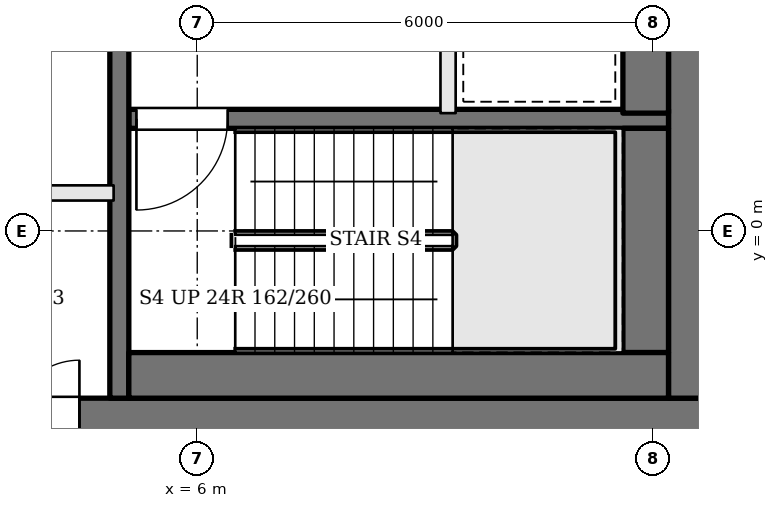
"""IFC4 building model, lengths in metres.
Left out: names, types, materials, properties, quantities, classifications, styles, units other than length and angle.
Written with IfcOpenShell. Run it as: python <this file> out.ifc"""

import sys

from ifc_helpers import new_model, si_unit, direction, frame, frame_2d, origin, place, context, subcontext, project, spatial, rectangle, extrude, element, fill, save


model = new_model("IFC4")
c1 = context("Model", 3, precision=1e-05, world=origin(), true_north=direction((0.0, 1.0)))
c2 = subcontext(c1, "Body", "Model", "MODEL_VIEW")
j1 = project(units=[si_unit("LENGTHUNIT", "METRE"), si_unit("PLANEANGLEUNIT", "RADIAN")], contexts=[c1])
p1 = place(None, origin())
s1 = spatial("IfcSite", under=j1, at=p1, CompositionType="ELEMENT")
p2 = place(p1, origin())
s2 = spatial("IfcBuilding", under=s1, at=p2, CompositionType="ELEMENT")
p3 = place(p2, frame((0.0, 0.0, 185.7)))
s3 = spatial("IfcBuildingStorey", under=s2, at=p3, CompositionType="ELEMENT", Elevation=185.7)
p4 = place(p3, frame((-13.0, -2.6, 0.0), z_axis=(0.0, 0.0, 1.0), x_axis=(1.0, 0.0, 0.0)))
e1 = element("IfcWall", 1, at=p4, inside=s3, PredefinedType="SHEAR", context=c2, shape_type="SweptSolid", body=[
    extrude(rectangle(XDim=26.0, YDim=0.8, at=frame_2d((13.0, 0.0))), origin(), (0.0, 0.0, 1.0), 3.9),
])
p5 = place(p4, frame((9.2, 0.0, 0.0)))
e2 = element("IfcOpeningElement", 2, at=p5, cuts=e1, PredefinedType="OPENING", context=c2, shape_type="SweptSolid", body=[
    extrude(rectangle(XDim=0.9, YDim=2.1, at=frame_2d((0.45, 1.05))), frame((0.0, 0.41, 0.0), z_axis=(0.0, -1.0, 0.0), x_axis=(1.0, 0.0, 0.0)), (0.0, 0.0, 1.0), 0.82),
])
p6 = place(p4, frame((12.3, 0.0, 0.0)))
e3 = element("IfcOpeningElement", 3, at=p6, cuts=e1, PredefinedType="OPENING", context=c2, shape_type="SweptSolid", body=[
    extrude(rectangle(XDim=0.9, YDim=2.1, at=frame_2d((0.45, 1.05))), frame((0.0, 0.41, 0.0), z_axis=(0.0, -1.0, 0.0), x_axis=(1.0, 0.0, 0.0)), (0.0, 0.0, 1.0), 0.82),
])
p7 = place(p4, frame((14.7, 0.0, 0.0)))
e4 = element("IfcOpeningElement", 4, at=p7, cuts=e1, PredefinedType="OPENING", context=c2, shape_type="SweptSolid", body=[
    extrude(rectangle(XDim=1.0, YDim=2.1, at=frame_2d((0.5, 1.05))), frame((0.0, 0.41, 0.0), z_axis=(0.0, -1.0, 0.0), x_axis=(1.0, 0.0, 0.0)), (0.0, 0.0, 1.0), 0.82),
])
p8 = place(p4, frame((16.55, 0.0, 0.0)))
e5 = element("IfcOpeningElement", 5, at=p8, cuts=e1, PredefinedType="OPENING", context=c2, shape_type="SweptSolid", body=[
    extrude(rectangle(XDim=0.9, YDim=2.1, at=frame_2d((0.45, 1.05))), frame((0.0, 0.41, 0.0), z_axis=(0.0, -1.0, 0.0), x_axis=(1.0, 0.0, 0.0)), (0.0, 0.0, 1.0), 0.82),
])
p9 = place(p3, frame((12.6, -2.2, 0.0), z_axis=(0.0, 0.0, 1.0), x_axis=(0.0, 1.0, 0.0)))
e6 = element("IfcWall", 6, at=p9, inside=s3, PredefinedType="SHEAR", context=c2, shape_type="SweptSolid", body=[
    extrude(rectangle(XDim=13.4, YDim=0.8, at=frame_2d((6.7, 0.0))), origin(), (0.0, 0.0, 1.0), 3.9),
])
p10 = place(p9, frame((7.4, 0.0, 0.0)))
e7 = element("IfcOpeningElement", 7, at=p10, cuts=e6, PredefinedType="OPENING", context=c2, shape_type="SweptSolid", body=[
    extrude(rectangle(XDim=1.8, YDim=2.1, at=frame_2d((0.9, 1.05))), frame((0.0, 0.41, 0.0), z_axis=(0.0, -1.0, 0.0), x_axis=(1.0, 0.0, 0.0)), (0.0, 0.0, 1.0), 0.82),
])
p11 = place(p3, frame((12.2, 1.475, 0.0), z_axis=(0.0, 0.0, 1.0), x_axis=(-1.0, 0.0, 0.0)))
e8 = element("IfcWall", 8, at=p11, inside=s3, PredefinedType="SOLIDWALL", context=c2, shape_type="SweptSolid", body=[
    extrude(rectangle(XDim=7.1, YDim=0.25, at=frame_2d((3.55, 0.0))), origin(), (0.0, 0.0, 1.0), 3.7),
])
p12 = place(p11, frame((5.8, 0.0, 0.0)))
e9 = element("IfcOpeningElement", 9, at=p12, cuts=e8, PredefinedType="OPENING", context=c2, shape_type="SweptSolid", body=[
    extrude(rectangle(XDim=1.2, YDim=2.1, at=frame_2d((0.6, 1.05))), frame((0.0, 0.135, 0.0), z_axis=(0.0, -1.0, 0.0), x_axis=(1.0, 0.0, 0.0)), (0.0, 0.0, 1.0), 0.27),
])
p13 = place(p3, frame((9.3, 4.55, 0.0), z_axis=(0.0, 0.0, 1.0), x_axis=(0.0, -1.0, 0.0)))
e10 = element("IfcWall", 10, at=p13, inside=s3, PredefinedType="SOLIDWALL", context=c2, shape_type="SweptSolid", body=[
    extrude(rectangle(XDim=3.0, YDim=0.2, at=frame_2d((1.5, 0.0))), origin(), (0.0, 0.0, 1.0), 3.7),
])
p14 = place(p3, frame((4.975, 11.2, 0.0), z_axis=(0.0, 0.0, 1.0), x_axis=(0.0, -1.0, 0.0)))
e11 = element("IfcWall", 11, at=p14, inside=s3, PredefinedType="SOLIDWALL", context=c2, shape_type="SweptSolid", body=[
    extrude(rectangle(XDim=13.4, YDim=0.25, at=frame_2d((6.7, 0.0))), origin(), (0.0, 0.0, 1.0), 3.7),
])
p15 = place(p14, frame((5.25, 0.0, 0.0)))
e12 = element("IfcOpeningElement", 12, at=p15, cuts=e11, PredefinedType="OPENING", context=c2, shape_type="SweptSolid", body=[
    extrude(rectangle(XDim=1.2, YDim=2.1, at=frame_2d((0.6, 1.05))), frame((0.0, 0.135, 0.0), z_axis=(0.0, -1.0, 0.0), x_axis=(1.0, 0.0, 0.0)), (0.0, 0.0, 1.0), 0.27),
])
p16 = place(p3, frame((11.9, 4.55, 0.0), z_axis=(0.0, 0.0, 1.0), x_axis=(0.0, -1.0, 0.0)))
e13 = element("IfcWall", 13, at=p16, inside=s3, PredefinedType="SOLIDWALL", context=c2, shape_type="SweptSolid", body=[
    extrude(rectangle(XDim=3.0, YDim=0.6, at=frame_2d((1.5, 0.0))), origin(), (0.0, 0.0, 1.0), 3.7),
])
p17 = place(p3, frame((11.9, 1.35, 0.0), z_axis=(0.0, 0.0, 1.0), x_axis=(0.0, -1.0, 0.0)))
e14 = element("IfcWall", 14, at=p17, inside=s3, PredefinedType="SOLIDWALL", context=c2, shape_type="SweptSolid", body=[
    extrude(rectangle(XDim=2.95, YDim=0.6, at=frame_2d((1.475, 0.0))), origin(), (0.0, 0.0, 1.0), 3.7),
])
p18 = place(p3, frame((12.2, -1.9, 0.0), z_axis=(0.0, 0.0, 1.0), x_axis=(-1.0, 0.0, 0.0)))
e15 = element("IfcWall", 15, at=p18, inside=s3, PredefinedType="SOLIDWALL", context=c2, shape_type="SweptSolid", body=[
    extrude(rectangle(XDim=7.1, YDim=0.6, at=frame_2d((3.55, 0.0))), origin(), (0.0, 0.0, 1.0), 3.7),
])
p19 = place(p3, frame((-4.9, 0.5, 0.0), z_axis=(0.0, 0.0, 1.0), x_axis=(1.0, 0.0, 0.0)))
e16 = element("IfcWall", 16, at=p19, inside=s3, PredefinedType="SOLIDWALL", context=c2, shape_type="SweptSolid", body=[
    extrude(rectangle(XDim=9.8, YDim=0.2, at=frame_2d((4.9, 0.0))), origin(), (0.0, 0.0, 1.0), 3.7),
])
p20 = place(p12, origin())
e17 = element("IfcDoor", 17, at=p20, inside=s3, OperationType="SINGLE_SWING_RIGHT", PredefinedType="DOOR", context=c2, shape_type="SweptSolid", body=[
    extrude(rectangle(XDim=1.2, YDim=2.1, at=frame_2d((0.6, 1.05))), frame((0.0, 0.025, 0.0), z_axis=(0.0, -1.0, 0.0), x_axis=(1.0, 0.0, 0.0)), (0.0, 0.0, 1.0), 0.05),
])
fill(e9, e17)
p21 = place(p8, origin())
e18 = element("IfcDoor", 18, at=p21, inside=s3, OperationType="SINGLE_SWING_RIGHT", PredefinedType="DOOR", context=c2, shape_type="SweptSolid", body=[
    extrude(rectangle(XDim=0.9, YDim=2.1, at=frame_2d((0.45, 1.05))), frame((0.0, 0.025, 0.0), z_axis=(0.0, -1.0, 0.0), x_axis=(1.0, 0.0, 0.0)), (0.0, 0.0, 1.0), 0.05),
])
fill(e5, e18)
save(model, sys.argv[1])
